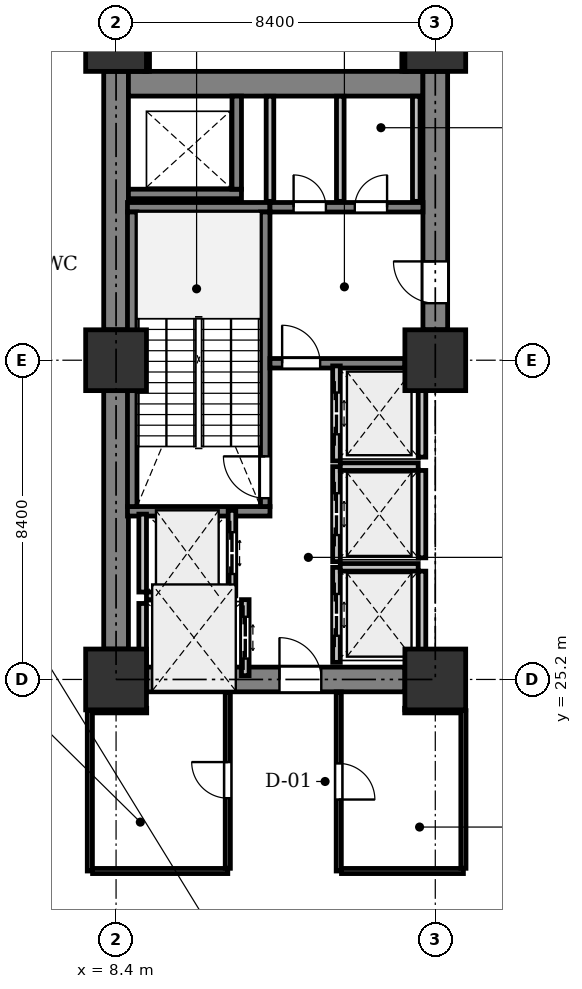
"""IFC4 building model, lengths in metres.
Left out: names, types, materials, properties, quantities, classifications, styles, units other than length and angle.
Written with IfcOpenShell. Run it as: python <this file> out.ifc"""

import sys

from ifc_helpers import new_model, si_unit, direction, frame, frame_2d, origin, origin_2d, place, context, subcontext, project, spatial, rectangle, extrude, element, fill, save


model = new_model("IFC4")
c1 = context("Model", 3, precision=1e-05, world=origin(), true_north=direction((0.0, 1.0)))
c2 = subcontext(c1, "Body", "Model", "MODEL_VIEW")
j1 = project(units=[si_unit("LENGTHUNIT", "METRE"), si_unit("PLANEANGLEUNIT", "RADIAN")], contexts=[c1])
p1 = place(None, origin())
s1 = spatial("IfcSite", under=j1, at=p1, CompositionType="ELEMENT")
p2 = place(p1, origin())
s2 = spatial("IfcBuilding", under=s1, at=p2, CompositionType="ELEMENT")
p3 = place(p2, frame((0.0, 0.0, 5.4)))
s3 = spatial("IfcBuildingStorey", under=s2, at=p3, CompositionType="ELEMENT", Elevation=5.4)
for number, where, z_axis, x_axis in (
    (1, (8.4, 25.2, 0.0), (0.0, 0.0, 1.0), (1.0, 0.0, 0.0)),
    (2, (8.4, 33.6, 0.0), (0.0, 0.0, 1.0), (1.0, 0.0, 0.0)),
    (3, (8.4, 42.0, 0.0), (0.0, 0.0, 1.0), (1.0, 0.0, 0.0)),
    (4, (16.8, 25.2, 0.0), (0.0, 0.0, 1.0), (1.0, 0.0, 0.0)),
    (5, (16.8, 33.6, 0.0), (0.0, 0.0, 1.0), (1.0, 0.0, 0.0)),
    (6, (16.8, 42.0, 0.0), (0.0, 0.0, 1.0), (1.0, 0.0, 0.0)),
):
    element("IfcColumn", number, at=place(p3, frame(where, z_axis=z_axis, x_axis=x_axis)), inside=s3, PredefinedType="COLUMN", context=c2, shape_type="SweptSolid", body=[
        extrude(rectangle(XDim=1.6, YDim=1.6, at=origin_2d()), origin(), (0.0, 0.0, 1.0), 4.8),
    ])
for number, where, z_axis, x_axis in (
    (7, (8.4, 26.0, 0.0), (0.0, 0.0, 1.0), (0.0, 1.0, 0.0)),
    (8, (8.4, 34.4, 0.0), (0.0, 0.0, 1.0), (0.0, 1.0, 0.0)),
):
    element("IfcWall", number, at=place(p3, frame(where, z_axis=z_axis, x_axis=x_axis)), inside=s3, PredefinedType="SHEAR", context=c2, shape_type="SweptSolid", body=[
        extrude(rectangle(XDim=6.8, YDim=0.65, at=frame_2d((3.4, 0.0))), origin(), (0.0, 0.0, 1.0), 4.525),
    ])
p4 = place(p3, frame((8.725, 40.875, 0.0), z_axis=(0.0, 0.0, 1.0), x_axis=(1.0, 0.0, 0.0)))
e9 = element("IfcWall", 9, at=p4, inside=s3, PredefinedType="SHEAR", context=c2, shape_type="SweptSolid", body=[
    extrude(rectangle(XDim=7.75, YDim=0.65, at=frame_2d((3.875, 0.0))), origin(), (0.0, 0.0, 1.0), 4.525),
])
p5 = place(p3, frame((16.8, 34.4, 0.0), z_axis=(0.0, 0.0, 1.0), x_axis=(0.0, 1.0, 0.0)))
e10 = element("IfcWall", 10, at=p5, inside=s3, PredefinedType="SHEAR", context=c2, shape_type="SweptSolid", body=[
    extrude(rectangle(XDim=6.8, YDim=0.65, at=frame_2d((3.4, 0.0))), origin(), (0.0, 0.0, 1.0), 4.525),
])
p6 = place(p5, frame((0.7, 0.0, 0.0)))
e11 = element("IfcOpeningElement", 11, at=p6, cuts=e10, PredefinedType="OPENING", context=c2, shape_type="SweptSolid", body=[
    extrude(rectangle(XDim=1.1, YDim=2.15, at=frame_2d((0.55, 1.075))), frame((0.0, 0.335, 0.0), z_axis=(0.0, -1.0, 0.0), x_axis=(1.0, 0.0, 0.0)), (0.0, 0.0, 1.0), 0.67),
])
p7 = place(p3, frame((9.2, 25.2, 0.0), z_axis=(0.0, 0.0, 1.0), x_axis=(1.0, 0.0, 0.0)))
e12 = element("IfcWall", 12, at=p7, inside=s3, PredefinedType="SHEAR", context=c2, shape_type="SweptSolid", body=[
    extrude(rectangle(XDim=6.8, YDim=0.65, at=frame_2d((3.4, 0.0))), origin(), (0.0, 0.0, 1.0), 4.525),
])
p8 = place(p7, frame((3.5, 0.0, 0.0)))
e13 = element("IfcOpeningElement", 13, at=p8, cuts=e12, PredefinedType="OPENING", context=c2, shape_type="SweptSolid", body=[
    extrude(rectangle(XDim=1.1, YDim=2.15, at=frame_2d((0.55, 1.075))), frame((0.0, 0.335, 0.0), z_axis=(0.0, -1.0, 0.0), x_axis=(1.0, 0.0, 0.0)), (0.0, 0.0, 1.0), 0.67),
])
for number, where, z_axis, x_axis in (
    (14, (12.45, 29.625, 0.0), (0.0, 0.0, 1.0), (-1.0, 0.0, 0.0)),
    (15, (12.45, 37.625, 0.0), (0.0, 0.0, 1.0), (-1.0, 0.0, 0.0)),
):
    element("IfcWall", number, at=place(p3, frame(where, z_axis=z_axis, x_axis=x_axis)), inside=s3, PredefinedType="SHEAR", context=c2, shape_type="SweptSolid", body=[
        extrude(rectangle(XDim=3.75, YDim=0.25, at=frame_2d((1.875, 0.0))), origin(), (0.0, 0.0, 1.0), 4.525),
    ])
p9 = place(p3, frame((12.325, 29.75, 0.0), z_axis=(0.0, 0.0, 1.0), x_axis=(0.0, 1.0, 0.0)))
e16 = element("IfcWall", 16, at=p9, inside=s3, PredefinedType="SHEAR", context=c2, shape_type="SweptSolid", body=[
    extrude(rectangle(XDim=7.75, YDim=0.25, at=frame_2d((3.875, 0.0))), origin(), (0.0, 0.0, 1.0), 4.525),
])
p10 = place(p9, frame((0.22, 0.0, 0.0)))
e17 = element("IfcOpeningElement", 17, at=p10, cuts=e16, PredefinedType="OPENING", context=c2, shape_type="SweptSolid", body=[
    extrude(rectangle(XDim=1.1, YDim=2.15, at=frame_2d((0.55, 1.075))), frame((0.0, 0.135, 0.0), z_axis=(0.0, -1.0, 0.0), x_axis=(1.0, 0.0, 0.0)), (0.0, 0.0, 1.0), 0.27),
])
p11 = place(p3, frame((8.825, 29.75, 0.0), z_axis=(0.0, 0.0, 1.0), x_axis=(0.0, 1.0, 0.0)))
e18 = element("IfcWall", 18, at=p11, inside=s3, PredefinedType="SHEAR", context=c2, shape_type="SweptSolid", body=[
    extrude(rectangle(XDim=7.75, YDim=0.25, at=frame_2d((3.875, 0.0))), origin(), (0.0, 0.0, 1.0), 4.525),
])
p12 = place(p3, frame((8.725, 37.975, 0.0), z_axis=(0.0, 0.0, 1.0), x_axis=(1.0, 0.0, 0.0)))
e19 = element("IfcWall", 19, at=p12, inside=s3, PredefinedType="SHEAR", context=c2, shape_type="SweptSolid", body=[
    extrude(rectangle(XDim=2.975, YDim=0.25, at=frame_2d((1.487, 0.0))), origin(), (0.0, 0.0, 1.0), 4.525),
])
p13 = place(p3, frame((11.575, 38.1, 0.0), z_axis=(0.0, 0.0, 1.0), x_axis=(0.0, 1.0, 0.0)))
e20 = element("IfcWall", 20, at=p13, inside=s3, PredefinedType="SHEAR", context=c2, shape_type="SweptSolid", body=[
    extrude(rectangle(XDim=2.45, YDim=0.25, at=frame_2d((1.225, 0.0))), origin(), (0.0, 0.0, 1.0), 4.525),
])
p14 = place(p3, frame((12.45, 33.52, 0.0), z_axis=(0.0, 0.0, 1.0), x_axis=(1.0, 0.0, 0.0)))
e21 = element("IfcWall", 21, at=p14, inside=s3, PredefinedType="SHEAR", context=c2, shape_type="SweptSolid", body=[
    extrude(rectangle(XDim=3.55, YDim=0.25, at=frame_2d((1.775, 0.0))), origin(), (0.0, 0.0, 1.0), 4.525),
])
p15 = place(p14, frame((0.32, 0.0, 0.0)))
e22 = element("IfcOpeningElement", 22, at=p15, cuts=e21, PredefinedType="OPENING", context=c2, shape_type="SweptSolid", body=[
    extrude(rectangle(XDim=1.0, YDim=2.15, at=frame_2d((0.5, 1.075))), frame((0.0, 0.135, 0.0), z_axis=(0.0, -1.0, 0.0), x_axis=(1.0, 0.0, 0.0)), (0.0, 0.0, 1.0), 0.27),
])
p16 = place(p3, frame((12.45, 37.625, 0.0), z_axis=(0.0, 0.0, 1.0), x_axis=(1.0, 0.0, 0.0)))
e23 = element("IfcWall", 23, at=p16, inside=s3, PredefinedType="SHEAR", context=c2, shape_type="SweptSolid", body=[
    extrude(rectangle(XDim=4.025, YDim=0.25, at=frame_2d((2.013, 0.0))), origin(), (0.0, 0.0, 1.0), 4.525),
])
p17 = place(p16, frame((0.622, 0.0, 0.0)))
e24 = element("IfcOpeningElement", 24, at=p17, cuts=e23, PredefinedType="OPENING", context=c2, shape_type="SweptSolid", body=[
    extrude(rectangle(XDim=0.85, YDim=2.15, at=frame_2d((0.425, 1.075))), frame((0.0, 0.135, 0.0), z_axis=(0.0, -1.0, 0.0), x_axis=(1.0, 0.0, 0.0)), (0.0, 0.0, 1.0), 0.27),
])
p18 = place(p16, frame((2.231, 0.0, 0.0)))
e25 = element("IfcOpeningElement", 25, at=p18, cuts=e23, PredefinedType="OPENING", context=c2, shape_type="SweptSolid", body=[
    extrude(rectangle(XDim=0.85, YDim=2.15, at=frame_2d((0.425, 1.075))), frame((0.0, 0.135, 0.0), z_axis=(0.0, -1.0, 0.0), x_axis=(1.0, 0.0, 0.0)), (0.0, 0.0, 1.0), 0.27),
])
p19 = place(p3, frame((11.45, 27.4, 0.0), z_axis=(0.0, 0.0, 1.0), x_axis=(0.0, 1.0, 0.0)))
e26 = element("IfcWall", 26, at=p19, inside=s3, PredefinedType="PARTITIONING", context=c2, shape_type="SweptSolid", body=[
    extrude(rectangle(XDim=2.25, YDim=0.2, at=frame_2d((1.125, 0.0))), origin(), (0.0, 0.0, 1.0), 4.525),
])
p20 = place(p19, frame((0.575, 0.0, 0.0)))
e27 = element("IfcOpeningElement", 27, at=p20, cuts=e26, PredefinedType="OPENING", context=c2, shape_type="SweptSolid", body=[
    extrude(rectangle(XDim=1.1, YDim=2.2, at=frame_2d((0.55, 1.1))), frame((0.0, 0.11, 0.0), z_axis=(0.0, -1.0, 0.0), x_axis=(1.0, 0.0, 0.0)), (0.0, 0.0, 1.0), 0.22),
])
p21 = place(p3, frame((9.1, 27.5, 0.0), z_axis=(0.0, 0.0, 1.0), x_axis=(0.0, 1.0, 0.0)))
e28 = element("IfcWall", 28, at=p21, inside=s3, PredefinedType="PARTITIONING", context=c2, shape_type="SweptSolid", body=[
    extrude(rectangle(XDim=2.05, YDim=0.2, at=frame_2d((1.025, 0.0))), origin(), (0.0, 0.0, 1.0), 4.525),
])
p22 = place(p3, frame((9.2, 27.4, 0.0), z_axis=(0.0, 0.0, 1.0), x_axis=(1.0, 0.0, 0.0)))
e29 = element("IfcWall", 29, at=p22, inside=s3, PredefinedType="PARTITIONING", context=c2, shape_type="SweptSolid", body=[
    extrude(rectangle(XDim=2.15, YDim=0.2, at=frame_2d((1.075, 0.0))), origin(), (0.0, 0.0, 1.0), 4.525),
])
p23 = place(p3, frame((11.8, 25.3, 0.0), z_axis=(0.0, 0.0, 1.0), x_axis=(0.0, 1.0, 0.0)))
e30 = element("IfcWall", 30, at=p23, inside=s3, PredefinedType="PARTITIONING", context=c2, shape_type="SweptSolid", body=[
    extrude(rectangle(XDim=2.0, YDim=0.2, at=frame_2d((1.0, 0.0))), origin(), (0.0, 0.0, 1.0), 4.525),
])
p24 = place(p23, frame((0.45, 0.0, 0.0)))
e31 = element("IfcOpeningElement", 31, at=p24, cuts=e30, PredefinedType="OPENING", context=c2, shape_type="SweptSolid", body=[
    extrude(rectangle(XDim=1.1, YDim=2.2, at=frame_2d((0.55, 1.1))), frame((0.0, 0.11, 0.0), z_axis=(0.0, -1.0, 0.0), x_axis=(1.0, 0.0, 0.0)), (0.0, 0.0, 1.0), 0.22),
])
p25 = place(p3, frame((9.1, 25.4, 0.0), z_axis=(0.0, 0.0, 1.0), x_axis=(0.0, 1.0, 0.0)))
e32 = element("IfcWall", 32, at=p25, inside=s3, PredefinedType="PARTITIONING", context=c2, shape_type="SweptSolid", body=[
    extrude(rectangle(XDim=1.8, YDim=0.2, at=frame_2d((0.9, 0.0))), origin(), (0.0, 0.0, 1.0), 4.525),
])
p26 = place(p3, frame((14.2, 25.65, 0.0), z_axis=(0.0, 0.0, 1.0), x_axis=(0.0, 1.0, 0.0)))
e33 = element("IfcWall", 33, at=p26, inside=s3, PredefinedType="PARTITIONING", context=c2, shape_type="SweptSolid", body=[
    extrude(rectangle(XDim=2.5, YDim=0.2, at=frame_2d((1.25, 0.0))), origin(), (0.0, 0.0, 1.0), 4.525),
])
p27 = place(p26, frame((0.7, 0.0, 0.0)))
e34 = element("IfcOpeningElement", 34, at=p27, cuts=e33, PredefinedType="OPENING", context=c2, shape_type="SweptSolid", body=[
    extrude(rectangle(XDim=1.1, YDim=2.2, at=frame_2d((0.55, 1.1))), frame((0.0, 0.11, 0.0), z_axis=(0.0, -1.0, 0.0), x_axis=(1.0, 0.0, 0.0)), (0.0, 0.0, 1.0), 0.22),
])
p28 = place(p3, frame((16.45, 25.75, 0.0), z_axis=(0.0, 0.0, 1.0), x_axis=(0.0, 1.0, 0.0)))
e35 = element("IfcWall", 35, at=p28, inside=s3, PredefinedType="PARTITIONING", context=c2, shape_type="SweptSolid", body=[
    extrude(rectangle(XDim=2.3, YDim=0.2, at=frame_2d((1.15, 0.0))), origin(), (0.0, 0.0, 1.0), 4.525),
])
p29 = place(p3, frame((14.3, 28.15, 0.0), z_axis=(0.0, 0.0, 1.0), x_axis=(1.0, 0.0, 0.0)))
e36 = element("IfcWall", 36, at=p29, inside=s3, PredefinedType="PARTITIONING", context=c2, shape_type="SweptSolid", body=[
    extrude(rectangle(XDim=2.05, YDim=0.2, at=frame_2d((1.025, 0.0))), origin(), (0.0, 0.0, 1.0), 4.525),
])
p30 = place(p3, frame((14.2, 28.3, 0.0), z_axis=(0.0, 0.0, 1.0), x_axis=(0.0, 1.0, 0.0)))
e37 = element("IfcWall", 37, at=p30, inside=s3, PredefinedType="PARTITIONING", context=c2, shape_type="SweptSolid", body=[
    extrude(rectangle(XDim=2.5, YDim=0.2, at=frame_2d((1.25, 0.0))), origin(), (0.0, 0.0, 1.0), 4.525),
])
p31 = place(p30, frame((0.7, 0.0, 0.0)))
e38 = element("IfcOpeningElement", 38, at=p31, cuts=e37, PredefinedType="OPENING", context=c2, shape_type="SweptSolid", body=[
    extrude(rectangle(XDim=1.1, YDim=2.2, at=frame_2d((0.55, 1.1))), frame((0.0, 0.11, 0.0), z_axis=(0.0, -1.0, 0.0), x_axis=(1.0, 0.0, 0.0)), (0.0, 0.0, 1.0), 0.22),
])
p32 = place(p3, frame((16.45, 28.4, 0.0), z_axis=(0.0, 0.0, 1.0), x_axis=(0.0, 1.0, 0.0)))
e39 = element("IfcWall", 39, at=p32, inside=s3, PredefinedType="PARTITIONING", context=c2, shape_type="SweptSolid", body=[
    extrude(rectangle(XDim=2.3, YDim=0.2, at=frame_2d((1.15, 0.0))), origin(), (0.0, 0.0, 1.0), 4.525),
])
p33 = place(p3, frame((14.3, 30.8, 0.0), z_axis=(0.0, 0.0, 1.0), x_axis=(1.0, 0.0, 0.0)))
e40 = element("IfcWall", 40, at=p33, inside=s3, PredefinedType="PARTITIONING", context=c2, shape_type="SweptSolid", body=[
    extrude(rectangle(XDim=2.05, YDim=0.2, at=frame_2d((1.025, 0.0))), origin(), (0.0, 0.0, 1.0), 4.525),
])
p34 = place(p3, frame((14.2, 30.95, 0.0), z_axis=(0.0, 0.0, 1.0), x_axis=(0.0, 1.0, 0.0)))
e41 = element("IfcWall", 41, at=p34, inside=s3, PredefinedType="PARTITIONING", context=c2, shape_type="SweptSolid", body=[
    extrude(rectangle(XDim=2.5, YDim=0.2, at=frame_2d((1.25, 0.0))), origin(), (0.0, 0.0, 1.0), 4.525),
])
p35 = place(p34, frame((0.7, 0.0, 0.0)))
e42 = element("IfcOpeningElement", 42, at=p35, cuts=e41, PredefinedType="OPENING", context=c2, shape_type="SweptSolid", body=[
    extrude(rectangle(XDim=1.1, YDim=2.2, at=frame_2d((0.55, 1.1))), frame((0.0, 0.11, 0.0), z_axis=(0.0, -1.0, 0.0), x_axis=(1.0, 0.0, 0.0)), (0.0, 0.0, 1.0), 0.22),
])
p36 = place(p3, frame((16.45, 31.05, 0.0), z_axis=(0.0, 0.0, 1.0), x_axis=(0.0, 1.0, 0.0)))
e43 = element("IfcWall", 43, at=p36, inside=s3, PredefinedType="PARTITIONING", context=c2, shape_type="SweptSolid", body=[
    extrude(rectangle(XDim=2.3, YDim=0.2, at=frame_2d((1.15, 0.0))), origin(), (0.0, 0.0, 1.0), 4.525),
])
for number, where, z_axis, x_axis in (
    (44, (14.3, 37.78, 0.0), (0.0, 0.0, 1.0), (0.0, 1.0, 0.0)),
    (45, (12.45, 40.546, 0.0), (0.0, 0.0, 1.0), (0.0, -1.0, 0.0)),
    (46, (16.3, 37.78, 0.0), (0.0, 0.0, 1.0), (0.0, 1.0, 0.0)),
):
    element("IfcWall", number, at=place(p3, frame(where, z_axis=z_axis, x_axis=x_axis)), inside=s3, PredefinedType="PARTITIONING", context=c2, shape_type="SweptSolid", body=[
        extrude(rectangle(XDim=2.766, YDim=0.2, at=frame_2d((1.383, 0.0))), origin(), (0.0, 0.0, 1.0), 3.425),
    ])
p37 = place(p3, frame((17.54, 24.38, 0.0), z_axis=(0.0, 0.0, 1.0), x_axis=(-0.99999980047, 0.000631711813, 0.0)))
e47 = element("IfcWall", 47, at=p37, inside=s3, PredefinedType="PARTITIONING", context=c2, shape_type="SweptSolid", body=[
    extrude(rectangle(XDim=1.546, YDim=0.12, at=frame_2d((0.773, 0.0))), origin(), (0.0, 0.0, 1.0), 3.913),
])
p38 = place(p3, frame((14.26, 24.871, 0.0), z_axis=(0.0, 0.0, 1.0), x_axis=(0.0, -1.0, 0.0)))
e48 = element("IfcWall", 48, at=p38, inside=s3, PredefinedType="PARTITIONING", context=c2, shape_type="SweptSolid", body=[
    extrude(rectangle(XDim=4.711, YDim=0.135, at=frame_2d((2.355, 0.0))), origin(), (0.0, 0.0, 1.0), 4.525),
])
p39 = place(p38, frame((1.881, 0.0, 0.0)))
e49 = element("IfcOpeningElement", 49, at=p39, cuts=e48, PredefinedType="OPENING", context=c2, shape_type="SweptSolid", body=[
    extrude(rectangle(XDim=0.95, YDim=2.15, at=frame_2d((0.475, 1.075))), frame((0.0, 0.077, 0.0), z_axis=(0.0, -1.0, 0.0), x_axis=(1.0, 0.0, 0.0)), (0.0, 0.0, 1.0), 0.155),
])
p40 = place(p3, frame((14.332, 20.16, 0.0), z_axis=(0.0, 0.0, 1.0), x_axis=(1.0, 0.0, 0.0)))
e50 = element("IfcWall", 50, at=p40, inside=s3, PredefinedType="PARTITIONING", context=c2, shape_type="SweptSolid", body=[
    extrude(rectangle(XDim=3.208, YDim=0.135, at=frame_2d((1.604, 0.0))), origin(), (0.0, 0.0, 1.0), 3.913),
])
p41 = place(p3, frame((17.54, 20.231, 0.0), z_axis=(0.0, 0.0, 1.0), x_axis=(0.0, 1.0, 0.0)))
e51 = element("IfcWall", 51, at=p41, inside=s3, PredefinedType="PARTITIONING", context=c2, shape_type="SweptSolid", body=[
    extrude(rectangle(XDim=4.148, YDim=0.135, at=frame_2d((2.074, 0.0))), origin(), (0.0, 0.0, 1.0), 4.525),
])
for number, where, z_axis, x_axis in (
    (52, (9.22, 42.8, 0.0), (0.0, 0.0, 1.0), (0.0, -1.0, 0.0)),
    (53, (15.98, 41.204, 0.0), (0.0, 0.0, 1.0), (0.0, 1.0, 0.0)),
):
    element("IfcWall", number, at=place(p3, frame(where, z_axis=z_axis, x_axis=x_axis)), inside=s3, PredefinedType="PARTITIONING", context=c2, shape_type="SweptSolid", body=[
        extrude(rectangle(XDim=1.596, YDim=0.12, at=frame_2d((0.798, 0.0))), origin(), (0.0, 0.0, 1.0), 3.725),
    ])
p42 = place(p3, frame((9.206, 24.381, 0.0), z_axis=(0.0, 0.0, 1.0), x_axis=(-0.999999786895, -0.00065284791, 0.0)))
e54 = element("IfcWall", 54, at=p42, inside=s3, PredefinedType="PARTITIONING", context=c2, shape_type="SweptSolid", body=[
    extrude(rectangle(XDim=1.496, YDim=0.12, at=frame_2d((0.748, 0.0))), origin(), (0.0, 0.0, 1.0), 3.913),
])
p43 = place(p3, frame((7.71, 24.38, 0.0), z_axis=(0.0, 0.0, 1.0), x_axis=(0.0, -1.0, 0.0)))
e55 = element("IfcWall", 55, at=p43, inside=s3, PredefinedType="PARTITIONING", context=c2, shape_type="SweptSolid", body=[
    extrude(rectangle(XDim=4.22, YDim=0.135, at=frame_2d((2.11, 0.0))), origin(), (0.0, 0.0, 1.0), 4.525),
])
p44 = place(p3, frame((7.781, 20.16, 0.0), z_axis=(0.0, 0.0, 1.0), x_axis=(1.0, 0.0, 0.0)))
e56 = element("IfcWall", 56, at=p44, inside=s3, PredefinedType="PARTITIONING", context=c2, shape_type="SweptSolid", body=[
    extrude(rectangle(XDim=3.559, YDim=0.135, at=frame_2d((1.779, 0.0))), origin(), (0.0, 0.0, 1.0), 3.913),
])
p45 = place(p3, frame((11.34, 20.231, 0.0), z_axis=(0.0, 0.0, 1.0), x_axis=(0.0, 1.0, 0.0)))
e57 = element("IfcWall", 57, at=p45, inside=s3, PredefinedType="PARTITIONING", context=c2, shape_type="SweptSolid", body=[
    extrude(rectangle(XDim=4.64, YDim=0.135, at=frame_2d((2.32, 0.0))), origin(), (0.0, 0.0, 1.0), 4.525),
])
p46 = place(p45, frame((1.845, 0.0, 0.0)))
e58 = element("IfcOpeningElement", 58, at=p46, cuts=e57, PredefinedType="OPENING", context=c2, shape_type="SweptSolid", body=[
    extrude(rectangle(XDim=0.95, YDim=2.15, at=frame_2d((0.475, 1.075))), frame((0.0, 0.077, 0.0), z_axis=(0.0, -1.0, 0.0), x_axis=(1.0, 0.0, 0.0)), (0.0, 0.0, 1.0), 0.155),
])
p47 = place(p6, origin())
e59 = element("IfcDoor", 59, at=p47, inside=s3, OperationType="SINGLE_SWING_RIGHT", PredefinedType="DOOR", context=c2, shape_type="SweptSolid", body=[
    extrude(rectangle(XDim=1.1, YDim=2.15, at=frame_2d((0.55, 1.075))), frame((0.0, 0.025, 0.0), z_axis=(0.0, -1.0, 0.0), x_axis=(1.0, 0.0, 0.0)), (0.0, 0.0, 1.0), 0.05),
])
fill(e11, e59)
p48 = place(p8, origin())
e60 = element("IfcDoor", 60, at=p48, inside=s3, OperationType="SINGLE_SWING_LEFT", PredefinedType="DOOR", context=c2, shape_type="SweptSolid", body=[
    extrude(rectangle(XDim=1.1, YDim=2.15, at=frame_2d((0.55, 1.075))), frame((0.0, 0.025, 0.0), z_axis=(0.0, -1.0, 0.0), x_axis=(1.0, 0.0, 0.0)), (0.0, 0.0, 1.0), 0.05),
])
fill(e13, e60)
p49 = place(p10, origin())
e61 = element("IfcDoor", 61, at=p49, inside=s3, OperationType="SINGLE_SWING_RIGHT", PredefinedType="DOOR", context=c2, shape_type="SweptSolid", body=[
    extrude(rectangle(XDim=1.1, YDim=2.15, at=frame_2d((0.55, 1.075))), frame((0.0, 0.025, 0.0), z_axis=(0.0, -1.0, 0.0), x_axis=(1.0, 0.0, 0.0)), (0.0, 0.0, 1.0), 0.05),
])
fill(e17, e61)
p50 = place(p15, origin())
e62 = element("IfcDoor", 62, at=p50, inside=s3, OperationType="SINGLE_SWING_LEFT", PredefinedType="DOOR", context=c2, shape_type="SweptSolid", body=[
    extrude(rectangle(XDim=1.0, YDim=2.15, at=frame_2d((0.5, 1.075))), frame((0.0, 0.025, 0.0), z_axis=(0.0, -1.0, 0.0), x_axis=(1.0, 0.0, 0.0)), (0.0, 0.0, 1.0), 0.05),
])
fill(e22, e62)
p51 = place(p20, origin())
e63 = element("IfcDoor", 63, at=p51, inside=s3, OperationType="DOUBLE_DOOR_SLIDING", PredefinedType="DOOR", context=c2, shape_type="SweptSolid", body=[
    extrude(rectangle(XDim=1.1, YDim=2.2, at=frame_2d((0.55, 1.1))), frame((0.0, 0.025, 0.0), z_axis=(0.0, -1.0, 0.0), x_axis=(1.0, 0.0, 0.0)), (0.0, 0.0, 1.0), 0.05),
])
fill(e27, e63)
p52 = place(p24, origin())
e64 = element("IfcDoor", 64, at=p52, inside=s3, OperationType="DOUBLE_DOOR_SLIDING", PredefinedType="DOOR", context=c2, shape_type="SweptSolid", body=[
    extrude(rectangle(XDim=1.1, YDim=2.2, at=frame_2d((0.55, 1.1))), frame((0.0, 0.025, 0.0), z_axis=(0.0, -1.0, 0.0), x_axis=(1.0, 0.0, 0.0)), (0.0, 0.0, 1.0), 0.05),
])
fill(e31, e64)
p53 = place(p27, origin())
e65 = element("IfcDoor", 65, at=p53, inside=s3, OperationType="DOUBLE_DOOR_SLIDING", PredefinedType="DOOR", context=c2, shape_type="SweptSolid", body=[
    extrude(rectangle(XDim=1.1, YDim=2.2, at=frame_2d((0.55, 1.1))), frame((0.0, 0.025, 0.0), z_axis=(0.0, -1.0, 0.0), x_axis=(1.0, 0.0, 0.0)), (0.0, 0.0, 1.0), 0.05),
])
fill(e34, e65)
p54 = place(p31, origin())
e66 = element("IfcDoor", 66, at=p54, inside=s3, OperationType="DOUBLE_DOOR_SLIDING", PredefinedType="DOOR", context=c2, shape_type="SweptSolid", body=[
    extrude(rectangle(XDim=1.1, YDim=2.2, at=frame_2d((0.55, 1.1))), frame((0.0, 0.025, 0.0), z_axis=(0.0, -1.0, 0.0), x_axis=(1.0, 0.0, 0.0)), (0.0, 0.0, 1.0), 0.05),
])
fill(e38, e66)
p55 = place(p35, origin())
e67 = element("IfcDoor", 67, at=p55, inside=s3, OperationType="DOUBLE_DOOR_SLIDING", PredefinedType="DOOR", context=c2, shape_type="SweptSolid", body=[
    extrude(rectangle(XDim=1.1, YDim=2.2, at=frame_2d((0.55, 1.1))), frame((0.0, 0.025, 0.0), z_axis=(0.0, -1.0, 0.0), x_axis=(1.0, 0.0, 0.0)), (0.0, 0.0, 1.0), 0.05),
])
fill(e42, e67)
p56 = place(p17, origin())
e68 = element("IfcDoor", 68, at=p56, inside=s3, OperationType="SINGLE_SWING_LEFT", PredefinedType="DOOR", context=c2, shape_type="SweptSolid", body=[
    extrude(rectangle(XDim=0.85, YDim=2.15, at=frame_2d((0.425, 1.075))), frame((0.0, 0.025, 0.0), z_axis=(0.0, -1.0, 0.0), x_axis=(1.0, 0.0, 0.0)), (0.0, 0.0, 1.0), 0.05),
])
fill(e24, e68)
p57 = place(p18, origin())
e69 = element("IfcDoor", 69, at=p57, inside=s3, OperationType="SINGLE_SWING_RIGHT", PredefinedType="DOOR", context=c2, shape_type="SweptSolid", body=[
    extrude(rectangle(XDim=0.85, YDim=2.15, at=frame_2d((0.425, 1.075))), frame((0.0, 0.025, 0.0), z_axis=(0.0, -1.0, 0.0), x_axis=(1.0, 0.0, 0.0)), (0.0, 0.0, 1.0), 0.05),
])
fill(e25, e69)
p58 = place(p39, origin())
e70 = element("IfcDoor", 70, at=p58, inside=s3, OperationType="SINGLE_SWING_RIGHT", PredefinedType="DOOR", context=c2, shape_type="SweptSolid", body=[
    extrude(rectangle(XDim=0.95, YDim=2.15, at=frame_2d((0.475, 1.075))), frame((0.0, 0.025, 0.0), z_axis=(0.0, -1.0, 0.0), x_axis=(1.0, 0.0, 0.0)), (0.0, 0.0, 1.0), 0.05),
])
fill(e49, e70)
p59 = place(p46, origin())
e71 = element("IfcDoor", 71, at=p59, inside=s3, OperationType="SINGLE_SWING_RIGHT", PredefinedType="DOOR", context=c2, shape_type="SweptSolid", body=[
    extrude(rectangle(XDim=0.95, YDim=2.15, at=frame_2d((0.475, 1.075))), frame((0.0, 0.025, 0.0), z_axis=(0.0, -1.0, 0.0), x_axis=(1.0, 0.0, 0.0)), (0.0, 0.0, 1.0), 0.05),
])
fill(e58, e71)
save(model, sys.argv[1])
